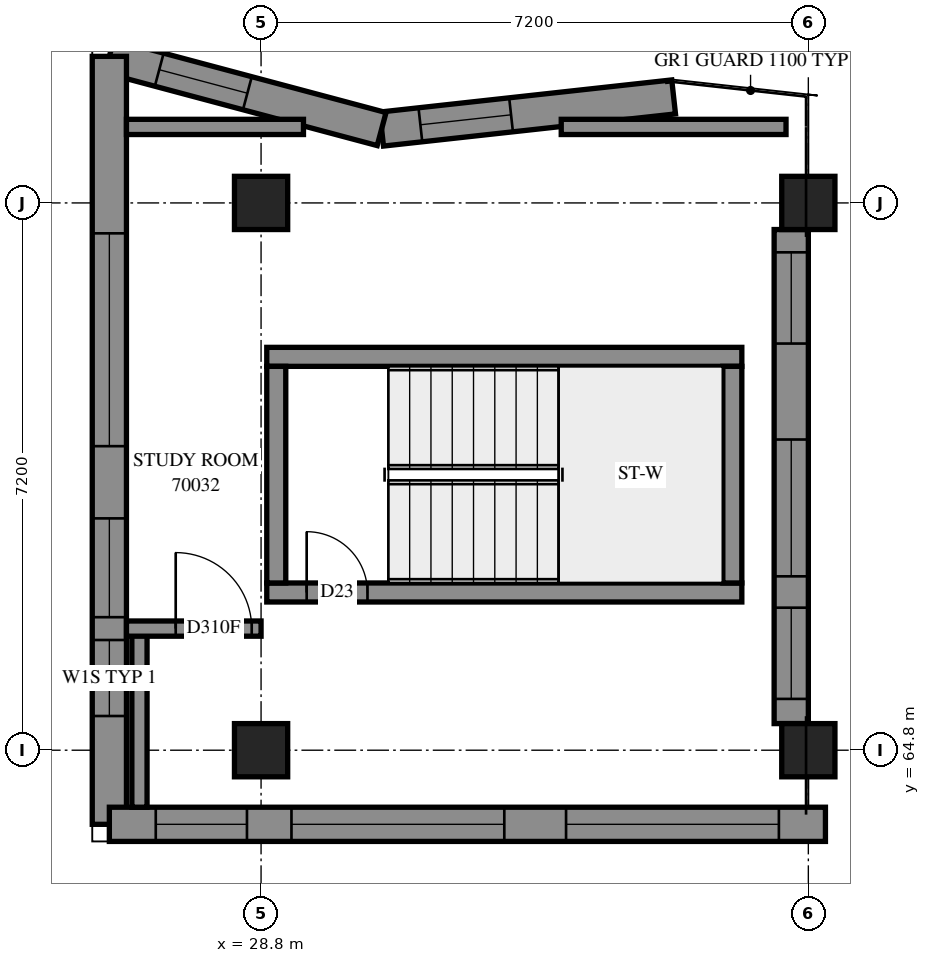
"""IFC4 building model, lengths in metres.
Left out: names, types, materials, properties, quantities, classifications, styles, units other than length and angle.
Written with IfcOpenShell. Run it as: python <this file> out.ifc"""

import sys

from ifc_helpers import new_model, si_unit, direction, frame, frame_2d, origin, origin_2d, place, context, subcontext, project, spatial, polyline, rectangle, outline, extrude, element, fill, save


model = new_model("IFC4")
c1 = context("Model", 3, precision=1e-05, world=origin(), true_north=direction((0.0, 1.0)))
c2 = subcontext(c1, "Body", "Model", "MODEL_VIEW")
j1 = project(units=[si_unit("LENGTHUNIT", "METRE"), si_unit("PLANEANGLEUNIT", "RADIAN")], contexts=[c1])
p1 = place(None, origin())
s1 = spatial("IfcSite", under=j1, at=p1, CompositionType="ELEMENT")
p2 = place(p1, origin())
s2 = spatial("IfcBuilding", under=s1, at=p2, CompositionType="ELEMENT")
p3 = place(p2, frame((0.0, 0.0, 257.4)))
s3 = spatial("IfcBuildingStorey", under=s2, at=p3, CompositionType="ELEMENT", Elevation=257.4)
for number, where, z_axis, x_axis in (
    (1, (28.8, 64.8, 0.0), (0.0, 0.0, 1.0), (1.0, 0.0, 0.0)),
    (2, (28.8, 72.0, 0.0), (0.0, 0.0, 1.0), (1.0, 0.0, 0.0)),
    (3, (36.0, 64.8, 0.0), (0.0, 0.0, 1.0), (1.0, 0.0, 0.0)),
    (4, (36.0, 72.0, 0.0), (0.0, 0.0, 1.0), (1.0, 0.0, 0.0)),
):
    element("IfcColumn", number, at=place(p3, frame(where, z_axis=z_axis, x_axis=x_axis)), inside=s3, PredefinedType="COLUMN", context=c2, shape_type="SweptSolid", body=[
        extrude(rectangle(XDim=0.7, YDim=0.7, at=origin_2d()), origin(), (0.0, 0.0, 1.0), 3.1),
    ])
p4 = place(p3, frame((34.228, 73.395, 0.0), z_axis=(0.0, 0.0, 1.0), x_axis=(-0.9939952411, -0.1094233099, 0.0)))
e5 = element("IfcWall", 5, at=p4, inside=s3, PredefinedType="SOLIDWALL", context=c2, shape_type="SweptSolid", body=[
    extrude(outline(polyline([(-0.025, -0.225), (3.823, -0.225), (3.907, 0.225), (0.025, 0.225), (-0.025, -0.225)])), origin(), (0.0, 0.0, 1.0), 3.1),
])
p5 = place(p4, frame((2.152, 0.0, 0.45)))
e6 = element("IfcOpeningElement", 6, at=p5, cuts=e5, PredefinedType="OPENING", context=c2, shape_type="SweptSolid", body=[
    extrude(rectangle(XDim=1.2, YDim=2.55, at=frame_2d((0.6, 1.275))), frame((0.0, 0.235, 0.0), z_axis=(0.0, -1.0, 0.0), x_axis=(1.0, 0.0, 0.0)), (0.0, 0.0, 1.0), 0.47),
])
p6 = place(p3, frame((30.386, 72.972, 0.0), z_axis=(0.0, 0.0, 1.0), x_axis=(-0.9661561055, 0.257958097, 0.0)))
e7 = element("IfcWall", 7, at=p6, inside=s3, PredefinedType="SOLIDWALL", context=c2, shape_type="SweptSolid", body=[
    extrude(outline(polyline([(0.042, -0.225), (4.0, -0.225), (3.415, 0.225), (-0.042, 0.225), (0.042, -0.225)])), origin(), (0.0, 0.0, 1.0), 3.1),
])
p7 = place(p6, frame((1.828, 0.0, 0.45)))
e8 = element("IfcOpeningElement", 8, at=p7, cuts=e7, PredefinedType="OPENING", context=c2, shape_type="SweptSolid", body=[
    extrude(rectangle(XDim=1.2, YDim=2.55, at=frame_2d((0.6, 1.275))), frame((0.0, 0.235, 0.0), z_axis=(0.0, -1.0, 0.0), x_axis=(1.0, 0.0, 0.0)), (0.0, 0.0, 1.0), 0.47),
])
p8 = place(p3, frame((26.804, 73.928, 0.0), z_axis=(0.0, 0.0, 1.0), x_axis=(0.0, -1.0, 0.0)))
e9 = element("IfcWall", 9, at=p8, inside=s3, PredefinedType="SOLIDWALL", context=c2, shape_type="SweptSolid", body=[
    extrude(outline(polyline([(-0.293, -0.225), (10.328, -0.225), (9.878, 0.225), (0.293, 0.225), (-0.293, -0.225)])), origin(), (0.0, 0.0, 1.0), 3.1),
])
p9 = place(p8, frame((2.328, 0.0, 0.45)))
e10 = element("IfcOpeningElement", 10, at=p9, cuts=e9, PredefinedType="OPENING", context=c2, shape_type="SweptSolid", body=[
    extrude(rectangle(XDim=2.8, YDim=2.55, at=frame_2d((1.4, 1.275))), frame((0.0, 0.235, 0.0), z_axis=(0.0, -1.0, 0.0), x_axis=(1.0, 0.0, 0.0)), (0.0, 0.0, 1.0), 0.47),
])
p10 = place(p8, frame((6.078, 0.0, 0.45)))
e11 = element("IfcOpeningElement", 11, at=p10, cuts=e9, PredefinedType="OPENING", context=c2, shape_type="SweptSolid", body=[
    extrude(rectangle(XDim=1.3, YDim=2.5, at=frame_2d((0.65, 1.25))), frame((0.0, 0.235, 0.0), z_axis=(0.0, -1.0, 0.0), x_axis=(1.0, 0.0, 0.0)), (0.0, 0.0, 1.0), 0.47),
])
p11 = place(p8, frame((7.678, 0.0, 0.45)))
e12 = element("IfcOpeningElement", 12, at=p11, cuts=e9, PredefinedType="OPENING", context=c2, shape_type="SweptSolid", body=[
    extrude(rectangle(XDim=1.0, YDim=2.5, at=frame_2d((0.5, 1.25))), frame((0.0, 0.235, 0.0), z_axis=(0.0, -1.0, 0.0), x_axis=(1.0, 0.0, 0.0)), (0.0, 0.0, 1.0), 0.47),
])
p12 = place(p3, frame((26.804, 63.825, 0.0), z_axis=(0.0, 0.0, 1.0), x_axis=(1.0, 0.0, 0.0)))
e13 = element("IfcWall", 13, at=p12, inside=s3, PredefinedType="SOLIDWALL", context=c2, shape_type="SweptSolid", body=[
    extrude(outline(polyline([(-0.225, -0.225), (9.196, -0.225), (9.646, 0.225), (0.225, 0.225), (-0.225, -0.225)])), origin(), (0.0, 0.0, 1.0), 3.1),
])
p13 = place(p12, frame((2.396, 0.0, 0.45)))
e14 = element("IfcOpeningElement", 14, at=p13, cuts=e13, PredefinedType="OPENING", context=c2, shape_type="SweptSolid", body=[
    extrude(rectangle(XDim=2.8, YDim=2.55, at=frame_2d((1.4, 1.275))), frame((0.0, 0.235, 0.0), z_axis=(0.0, -1.0, 0.0), x_axis=(1.0, 0.0, 0.0)), (0.0, 0.0, 1.0), 0.47),
])
p14 = place(p12, frame((6.008, 0.0, 0.45)))
e15 = element("IfcOpeningElement", 15, at=p14, cuts=e13, PredefinedType="OPENING", context=c2, shape_type="SweptSolid", body=[
    extrude(rectangle(XDim=2.8, YDim=2.55, at=frame_2d((1.4, 1.275))), frame((0.0, 0.235, 0.0), z_axis=(0.0, -1.0, 0.0), x_axis=(1.0, 0.0, 0.0)), (0.0, 0.0, 1.0), 0.47),
])
p15 = place(p12, frame((0.611, 0.0, 0.45)))
e16 = element("IfcOpeningElement", 16, at=p15, cuts=e13, PredefinedType="OPENING", context=c2, shape_type="SweptSolid", body=[
    extrude(rectangle(XDim=1.2, YDim=2.55, at=frame_2d((0.6, 1.275))), frame((0.0, 0.235, 0.0), z_axis=(0.0, -1.0, 0.0), x_axis=(1.0, 0.0, 0.0)), (0.0, 0.0, 1.0), 0.47),
])
p16 = place(p3, frame((35.775, 65.15, 0.0), z_axis=(0.0, 0.0, 1.0), x_axis=(0.0, 1.0, 0.0)))
e17 = element("IfcWall", 17, at=p16, inside=s3, PredefinedType="SOLIDWALL", context=c2, shape_type="SweptSolid", body=[
    extrude(rectangle(XDim=6.5, YDim=0.45, at=frame_2d((3.25, 0.0))), origin(), (0.0, 0.0, 1.0), 3.1),
])
p17 = place(p16, frame((0.325, 0.0, 0.6)))
e18 = element("IfcOpeningElement", 18, at=p17, cuts=e17, PredefinedType="OPENING", context=c2, shape_type="SweptSolid", body=[
    extrude(rectangle(XDim=1.2, YDim=1.9, at=frame_2d((0.6, 0.95))), frame((0.0, 0.235, 0.0), z_axis=(0.0, -1.0, 0.0), x_axis=(1.0, 0.0, 0.0)), (0.0, 0.0, 1.0), 0.47),
])
p18 = place(p16, frame((1.938, 0.0, 0.7)))
e19 = element("IfcOpeningElement", 19, at=p18, cuts=e17, PredefinedType="OPENING", context=c2, shape_type="SweptSolid", body=[
    extrude(rectangle(XDim=1.8, YDim=1.8, at=frame_2d((0.9, 0.9))), frame((0.0, 0.235, 0.0), z_axis=(0.0, -1.0, 0.0), x_axis=(1.0, 0.0, 0.0)), (0.0, 0.0, 1.0), 0.47),
])
p19 = place(p16, frame((5.0, 0.0, 0.6)))
e20 = element("IfcOpeningElement", 20, at=p19, cuts=e17, PredefinedType="OPENING", context=c2, shape_type="SweptSolid", body=[
    extrude(rectangle(XDim=1.2, YDim=1.9, at=frame_2d((0.6, 0.95))), frame((0.0, 0.235, 0.0), z_axis=(0.0, -1.0, 0.0), x_axis=(1.0, 0.0, 0.0)), (0.0, 0.0, 1.0), 0.47),
])
p20 = place(p3, frame((28.875, 66.875, -0.3), z_axis=(0.0, 0.0, 1.0), x_axis=(1.0, 0.0, 0.0)))
e21 = element("IfcWall", 21, at=p20, inside=s3, PredefinedType="SOLIDWALL", context=c2, shape_type="SweptSolid", body=[
    extrude(rectangle(XDim=6.25, YDim=0.25, at=frame_2d((3.125, 0.0))), origin(), (0.0, 0.0, 1.0), 3.4),
])
p21 = place(p20, frame((0.525, 0.0, 0.3)))
e22 = element("IfcOpeningElement", 22, at=p21, cuts=e21, PredefinedType="OPENING", context=c2, shape_type="SweptSolid", body=[
    extrude(rectangle(XDim=0.8, YDim=2.1, at=frame_2d((0.4, 1.05))), frame((0.0, 0.135, 0.0), z_axis=(0.0, -1.0, 0.0), x_axis=(1.0, 0.0, 0.0)), (0.0, 0.0, 1.0), 0.27),
])
p22 = place(p3, frame((28.875, 69.975, -0.3), z_axis=(0.0, 0.0, 1.0), x_axis=(1.0, 0.0, 0.0)))
e23 = element("IfcWall", 23, at=p22, inside=s3, PredefinedType="SOLIDWALL", context=c2, shape_type="SweptSolid", body=[
    extrude(rectangle(XDim=6.25, YDim=0.25, at=frame_2d((3.125, 0.0))), origin(), (0.0, 0.0, 1.0), 3.4),
])
for number, where, z_axis, x_axis in (
    (24, (29.0, 67.0, -0.3), (0.0, 0.0, 1.0), (0.0, 1.0, 0.0)),
    (25, (35.0, 67.0, -0.3), (0.0, 0.0, 1.0), (0.0, 1.0, 0.0)),
):
    element("IfcWall", number, at=place(p3, frame(where, z_axis=z_axis, x_axis=x_axis)), inside=s3, PredefinedType="SOLIDWALL", context=c2, shape_type="SweptSolid", body=[
        extrude(rectangle(XDim=2.85, YDim=0.25, at=frame_2d((1.425, 0.0))), origin(), (0.0, 0.0, 1.0), 3.4),
    ])
p23 = place(p3, frame((32.749, 73.0, 0.0), z_axis=(0.0, 0.0, 1.0), x_axis=(1.0, 0.0, 0.0)))
e26 = element("IfcWall", 26, at=p23, inside=s3, PredefinedType="PARTITIONING", context=c2, shape_type="SweptSolid", body=[
    extrude(rectangle(XDim=2.957, YDim=0.2, at=frame_2d((1.479, 0.0))), origin(), (0.0, 0.0, 1.0), 3.1),
])
p24 = place(p3, frame((27.2, 64.05, 0.0), z_axis=(0.0, 0.0, 1.0), x_axis=(0.0, 1.0, 0.0)))
e27 = element("IfcWall", 27, at=p24, inside=s3, PredefinedType="PARTITIONING", context=c2, shape_type="SweptSolid", body=[
    extrude(rectangle(XDim=2.348, YDim=0.2, at=frame_2d((1.174, 0.0))), origin(), (0.0, 0.0, 1.0), 3.1),
])
p25 = place(p3, frame((27.029, 73.0, 0.0), z_axis=(0.0, 0.0, 1.0), x_axis=(1.0, 0.0, 0.0)))
e28 = element("IfcWall", 28, at=p25, inside=s3, PredefinedType="PARTITIONING", context=c2, shape_type="SweptSolid", body=[
    extrude(rectangle(XDim=2.329, YDim=0.2, at=frame_2d((1.164, 0.0))), origin(), (0.0, 0.0, 1.0), 3.1),
])
p26 = place(p3, frame((27.029, 66.4, 0.0), z_axis=(0.0, 0.0, 1.0), x_axis=(1.0, 0.0, 0.0)))
e29 = element("IfcWall", 29, at=p26, inside=s3, PredefinedType="PARTITIONING", context=c2, shape_type="SweptSolid", body=[
    extrude(rectangle(XDim=1.771, YDim=0.2, at=frame_2d((0.885, 0.0))), origin(), (0.0, 0.0, 1.0), 3.1),
])
p27 = place(p26, frame((0.648, 0.0, 0.0)))
e30 = element("IfcOpeningElement", 30, at=p27, cuts=e29, PredefinedType="OPENING", context=c2, shape_type="SweptSolid", body=[
    extrude(rectangle(XDim=1.0, YDim=2.1, at=frame_2d((0.5, 1.05))), frame((0.0, 0.11, 0.0), z_axis=(0.0, -1.0, 0.0), x_axis=(1.0, 0.0, 0.0)), (0.0, 0.0, 1.0), 0.22),
])
p28 = place(p5, origin())
e31 = element("IfcWindow", 31, at=p28, inside=s3, PartitioningType="SINGLE_PANEL", PredefinedType="WINDOW", context=c2, shape_type="SweptSolid", body=[
    extrude(rectangle(XDim=1.2, YDim=2.55, at=frame_2d((0.6, 1.275))), frame((0.0, 0.205, 0.0), z_axis=(0.0, -1.0, 0.0), x_axis=(1.0, 0.0, 0.0)), (0.0, 0.0, 1.0), 0.06),
])
fill(e6, e31)
p29 = place(p7, origin())
e32 = element("IfcWindow", 32, at=p29, inside=s3, PartitioningType="SINGLE_PANEL", PredefinedType="WINDOW", context=c2, shape_type="SweptSolid", body=[
    extrude(rectangle(XDim=1.2, YDim=2.55, at=frame_2d((0.6, 1.275))), frame((0.0, 0.205, 0.0), z_axis=(0.0, -1.0, 0.0), x_axis=(1.0, 0.0, 0.0)), (0.0, 0.0, 1.0), 0.06),
])
fill(e8, e32)
p30 = place(p9, origin())
e33 = element("IfcWindow", 33, at=p30, inside=s3, PartitioningType="SINGLE_PANEL", PredefinedType="WINDOW", context=c2, shape_type="SweptSolid", body=[
    extrude(rectangle(XDim=2.8, YDim=2.55, at=frame_2d((1.4, 1.275))), frame((0.0, 0.205, 0.0), z_axis=(0.0, -1.0, 0.0), x_axis=(1.0, 0.0, 0.0)), (0.0, 0.0, 1.0), 0.06),
])
fill(e10, e33)
p31 = place(p13, origin())
e34 = element("IfcWindow", 34, at=p31, inside=s3, PartitioningType="SINGLE_PANEL", PredefinedType="WINDOW", context=c2, shape_type="SweptSolid", body=[
    extrude(rectangle(XDim=2.8, YDim=2.55, at=frame_2d((1.4, 1.275))), frame((0.0, 0.205, 0.0), z_axis=(0.0, -1.0, 0.0), x_axis=(1.0, 0.0, 0.0)), (0.0, 0.0, 1.0), 0.06),
])
fill(e14, e34)
p32 = place(p14, origin())
e35 = element("IfcWindow", 35, at=p32, inside=s3, PartitioningType="SINGLE_PANEL", PredefinedType="WINDOW", context=c2, shape_type="SweptSolid", body=[
    extrude(rectangle(XDim=2.8, YDim=2.55, at=frame_2d((1.4, 1.275))), frame((0.0, 0.205, 0.0), z_axis=(0.0, -1.0, 0.0), x_axis=(1.0, 0.0, 0.0)), (0.0, 0.0, 1.0), 0.06),
])
fill(e15, e35)
p33 = place(p15, origin())
e36 = element("IfcWindow", 36, at=p33, inside=s3, PartitioningType="SINGLE_PANEL", PredefinedType="WINDOW", context=c2, shape_type="SweptSolid", body=[
    extrude(rectangle(XDim=1.2, YDim=2.55, at=frame_2d((0.6, 1.275))), frame((0.0, 0.205, 0.0), z_axis=(0.0, -1.0, 0.0), x_axis=(1.0, 0.0, 0.0)), (0.0, 0.0, 1.0), 0.06),
])
fill(e16, e36)
p34 = place(p21, origin())
e37 = element("IfcDoor", 37, at=p34, inside=s3, OperationType="SINGLE_SWING_LEFT", PredefinedType="DOOR", context=c2, shape_type="SweptSolid", body=[
    extrude(rectangle(XDim=0.8, YDim=2.1, at=frame_2d((0.4, 1.05))), frame((0.0, 0.025, 0.0), z_axis=(0.0, -1.0, 0.0), x_axis=(1.0, 0.0, 0.0)), (0.0, 0.0, 1.0), 0.05),
])
fill(e22, e37)
p35 = place(p27, origin())
e38 = element("IfcDoor", 38, at=p35, inside=s3, OperationType="SINGLE_SWING_RIGHT", PredefinedType="DOOR", context=c2, shape_type="SweptSolid", body=[
    extrude(rectangle(XDim=1.0, YDim=2.1, at=frame_2d((0.5, 1.05))), frame((0.0, 0.025, 0.0), z_axis=(0.0, -1.0, 0.0), x_axis=(1.0, 0.0, 0.0)), (0.0, 0.0, 1.0), 0.05),
])
fill(e30, e38)
p36 = place(p10, origin())
e39 = element("IfcWindow", 39, at=p36, inside=s3, PartitioningType="SINGLE_PANEL", PredefinedType="WINDOW", context=c2, shape_type="SweptSolid", body=[
    extrude(rectangle(XDim=1.3, YDim=2.5, at=frame_2d((0.65, 1.25))), frame((0.0, 0.205, 0.0), z_axis=(0.0, -1.0, 0.0), x_axis=(1.0, 0.0, 0.0)), (0.0, 0.0, 1.0), 0.06),
])
fill(e11, e39)
p37 = place(p11, origin())
e40 = element("IfcWindow", 40, at=p37, inside=s3, PartitioningType="SINGLE_PANEL", PredefinedType="WINDOW", context=c2, shape_type="SweptSolid", body=[
    extrude(rectangle(XDim=1.0, YDim=2.5, at=frame_2d((0.5, 1.25))), frame((0.0, 0.205, 0.0), z_axis=(0.0, -1.0, 0.0), x_axis=(1.0, 0.0, 0.0)), (0.0, 0.0, 1.0), 0.06),
])
fill(e12, e40)
p38 = place(p17, origin())
e41 = element("IfcWindow", 41, at=p38, inside=s3, PartitioningType="SINGLE_PANEL", PredefinedType="WINDOW", context=c2, shape_type="SweptSolid", body=[
    extrude(rectangle(XDim=1.2, YDim=1.9, at=frame_2d((0.6, 0.95))), frame((0.0, 0.205, 0.0), z_axis=(0.0, -1.0, 0.0), x_axis=(1.0, 0.0, 0.0)), (0.0, 0.0, 1.0), 0.06),
])
fill(e18, e41)
p39 = place(p18, origin())
e42 = element("IfcWindow", 42, at=p39, inside=s3, PartitioningType="SINGLE_PANEL", PredefinedType="WINDOW", context=c2, shape_type="SweptSolid", body=[
    extrude(rectangle(XDim=1.8, YDim=1.8, at=frame_2d((0.9, 0.9))), frame((0.0, 0.205, 0.0), z_axis=(0.0, -1.0, 0.0), x_axis=(1.0, 0.0, 0.0)), (0.0, 0.0, 1.0), 0.06),
])
fill(e19, e42)
p40 = place(p19, origin())
e43 = element("IfcWindow", 43, at=p40, inside=s3, PartitioningType="SINGLE_PANEL", PredefinedType="WINDOW", context=c2, shape_type="SweptSolid", body=[
    extrude(rectangle(XDim=1.2, YDim=1.9, at=frame_2d((0.6, 0.95))), frame((0.0, 0.205, 0.0), z_axis=(0.0, -1.0, 0.0), x_axis=(1.0, 0.0, 0.0)), (0.0, 0.0, 1.0), 0.06),
])
fill(e20, e43)
save(model, sys.argv[1])
